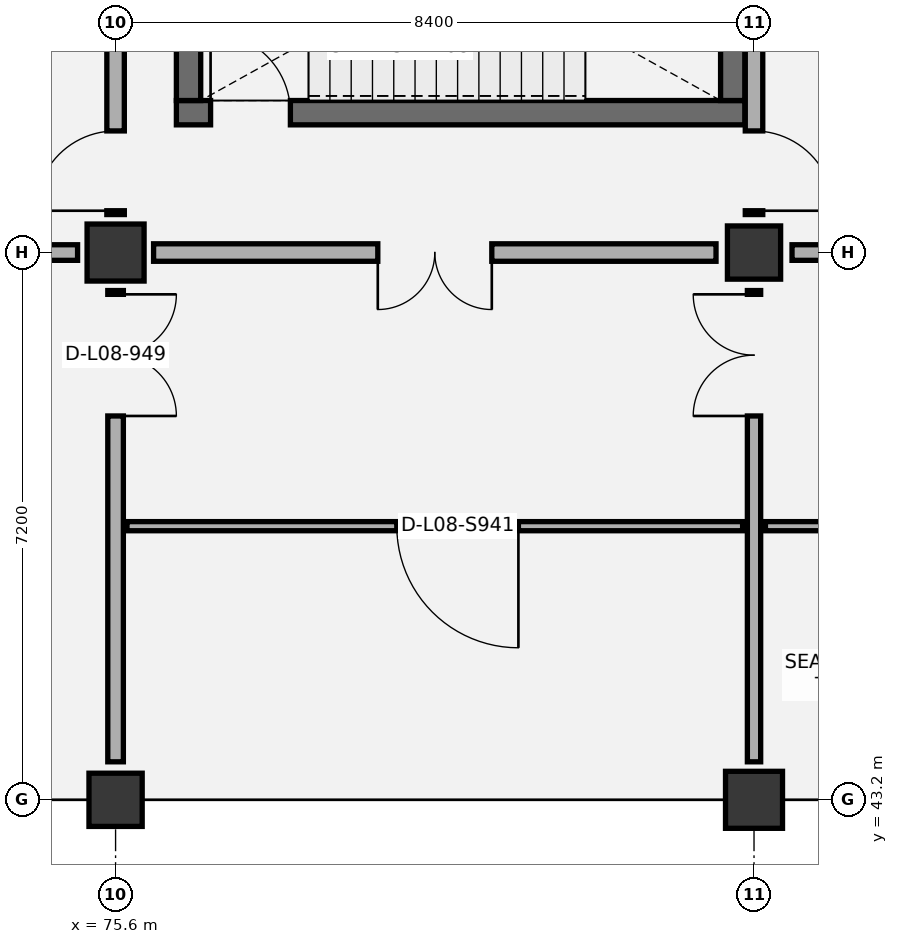
"""IFC4 building model, lengths in metres.
Left out: names, types, materials, properties, quantities, classifications, styles, units other than length and angle.
Written with IfcOpenShell. Run it as: python <this file> out.ifc"""

import sys

from ifc_helpers import new_model, si_unit, direction, frame, frame_2d, origin, origin_2d, place, context, subcontext, project, spatial, rectangle, extrude, element, fill, save


model = new_model("IFC4")
c1 = context("Model", 3, precision=1e-05, world=origin(), true_north=direction((0.0, 1.0)))
c2 = subcontext(c1, "Body", "Model", "MODEL_VIEW")
j1 = project(units=[si_unit("LENGTHUNIT", "METRE"), si_unit("PLANEANGLEUNIT", "RADIAN")], contexts=[c1])
p1 = place(None, origin())
s1 = spatial("IfcSite", under=j1, at=p1, CompositionType="ELEMENT")
p2 = place(p1, origin())
s2 = spatial("IfcBuilding", under=s1, at=p2, CompositionType="ELEMENT")
p3 = place(p2, frame((0.0, 0.0, 39.6)))
s3 = spatial("IfcBuildingStorey", under=s2, at=p3, CompositionType="ELEMENT", Elevation=39.6)
p4 = place(p3, frame((75.6, 43.2, 0.0), z_axis=(0.0, 0.0, 1.0), x_axis=(1.0, 0.0, 0.0)))
e1 = element("IfcColumn", 1, at=p4, inside=s3, PredefinedType="COLUMN", context=c2, shape_type="SweptSolid", body=[
    extrude(rectangle(XDim=0.7, YDim=0.7, at=origin_2d()), origin(), (0.0, 0.0, 1.0), 4.2),
])
for number, where, z_axis, x_axis in (
    (2, (75.6, 50.4, 0.0), (0.0, 0.0, 1.0), (1.0, 0.0, 0.0)),
    (3, (84.0, 43.2, 0.0), (0.0, 0.0, 1.0), (1.0, 0.0, 0.0)),
):
    element("IfcColumn", number, at=place(p3, frame(where, z_axis=z_axis, x_axis=x_axis)), inside=s3, PredefinedType="COLUMN", context=c2, shape_type="SweptSolid", body=[
        extrude(rectangle(XDim=0.75, YDim=0.75, at=origin_2d()), origin(), (0.0, 0.0, 1.0), 4.2),
    ])
p5 = place(p3, frame((84.0, 50.4, 0.0), z_axis=(0.0, 0.0, 1.0), x_axis=(1.0, 0.0, 0.0)))
e4 = element("IfcColumn", 4, at=p5, inside=s3, PredefinedType="COLUMN", context=c2, shape_type="SweptSolid", body=[
    extrude(rectangle(XDim=0.7, YDim=0.7, at=origin_2d()), origin(), (0.0, 0.0, 1.0), 4.2),
])
p6 = place(p3, frame((76.4, 52.24, 0.0), z_axis=(0.0, 0.0, 1.0), x_axis=(1.0, 0.0, 0.0)))
e5 = element("IfcWall", 5, at=p6, inside=s3, PredefinedType="SHEAR", context=c2, shape_type="SweptSolid", body=[
    extrude(rectangle(XDim=7.48, YDim=0.32, at=frame_2d((3.74, 0.0))), origin(), (0.0, 0.0, 1.0), 3.9),
])
p7 = place(p6, frame((0.45, 0.0, 0.0)))
e6 = element("IfcOpeningElement", 6, at=p7, cuts=e5, PredefinedType="OPENING", context=c2, shape_type="SweptSolid", body=[
    extrude(rectangle(XDim=1.05, YDim=2.15, at=frame_2d((0.525, 1.075))), frame((0.0, 0.17, 0.0), z_axis=(0.0, -1.0, 0.0), x_axis=(1.0, 0.0, 0.0)), (0.0, 0.0, 1.0), 0.34),
])
for number, where, z_axis, x_axis in (
    (7, (76.56, 52.4, 0.0), (0.0, 0.0, 1.0), (0.0, 1.0, 0.0)),
    (8, (83.72, 52.4, 0.0), (0.0, 0.0, 1.0), (0.0, 1.0, 0.0)),
):
    element("IfcWall", number, at=place(p3, frame(where, z_axis=z_axis, x_axis=x_axis)), inside=s3, PredefinedType="SHEAR", context=c2, shape_type="SweptSolid", body=[
        extrude(rectangle(XDim=3.8, YDim=0.32, at=frame_2d((1.9, 0.0))), origin(), (0.0, 0.0, 1.0), 3.9),
    ])
p8 = place(p3, frame((75.75, 46.8, 0.0), z_axis=(0.0, 0.0, 1.0), x_axis=(1.0, 0.0, 0.0)))
e9 = element("IfcWall", 9, at=p8, inside=s3, PredefinedType="PARTITIONING", context=c2, shape_type="SweptSolid", body=[
    extrude(rectangle(XDim=8.1, YDim=0.12, at=frame_2d((4.05, 0.0))), origin(), (0.0, 0.0, 1.0), 3.9),
])
p9 = place(p8, frame((3.55, 0.0, 0.0)))
e10 = element("IfcOpeningElement", 10, at=p9, cuts=e9, PredefinedType="OPENING", context=c2, shape_type="SweptSolid", body=[
    extrude(rectangle(XDim=1.6, YDim=2.2, at=frame_2d((0.8, 1.1))), frame((0.0, 0.07, 0.0), z_axis=(0.0, -1.0, 0.0), x_axis=(1.0, 0.0, 0.0)), (0.0, 0.0, 1.0), 0.14),
])
p10 = place(p3, frame((84.15, 46.8, 0.0), z_axis=(0.0, 0.0, 1.0), x_axis=(1.0, 0.0, 0.0)))
e11 = element("IfcWall", 11, at=p10, inside=s3, PredefinedType="PARTITIONING", context=c2, shape_type="SweptSolid", body=[
    extrude(rectangle(XDim=8.1, YDim=0.12, at=frame_2d((4.05, 0.0))), origin(), (0.0, 0.0, 1.0), 3.9),
])
p11 = place(p10, frame((3.55, 0.0, 0.0)))
e12 = element("IfcOpeningElement", 12, at=p11, cuts=e11, PredefinedType="OPENING", context=c2, shape_type="SweptSolid", body=[
    extrude(rectangle(XDim=1.6, YDim=2.2, at=frame_2d((0.8, 1.1))), frame((0.0, 0.07, 0.0), z_axis=(0.0, -1.0, 0.0), x_axis=(1.0, 0.0, 0.0)), (0.0, 0.0, 1.0), 0.14),
])
p12 = place(p3, frame((75.6, 43.7, 0.0), z_axis=(0.0, 0.0, 1.0), x_axis=(0.0, 1.0, 0.0)))
e13 = element("IfcWall", 13, at=p12, inside=s3, PredefinedType="PARTITIONING", context=c2, shape_type="SweptSolid", body=[
    extrude(rectangle(XDim=6.2, YDim=0.205, at=frame_2d((3.1, 0.0))), origin(), (0.0, 0.0, 1.0), 3.295),
])
p13 = place(p12, frame((4.55, 0.0, 0.0)))
e14 = element("IfcOpeningElement", 14, at=p13, cuts=e13, PredefinedType="OPENING", context=c2, shape_type="SweptSolid", body=[
    extrude(rectangle(XDim=1.6, YDim=2.2, at=frame_2d((0.8, 1.1))), frame((0.0, 0.113, 0.0), z_axis=(0.0, -1.0, 0.0), x_axis=(1.0, 0.0, 0.0)), (0.0, 0.0, 1.0), 0.225),
])
p14 = place(p3, frame((67.7, 50.4, 0.0), z_axis=(0.0, 0.0, 1.0), x_axis=(1.0, 0.0, 0.0)))
e15 = element("IfcWall", 15, at=p14, inside=s3, PredefinedType="PARTITIONING", context=c2, shape_type="SweptSolid", body=[
    extrude(rectangle(XDim=7.4, YDim=0.205, at=frame_2d((3.7, 0.0))), origin(), (0.0, 0.0, 1.0), 3.245),
])
p15 = place(p14, frame((2.95, 0.0, 0.0)))
e16 = element("IfcOpeningElement", 16, at=p15, cuts=e15, PredefinedType="OPENING", context=c2, shape_type="SweptSolid", body=[
    extrude(rectangle(XDim=1.5, YDim=2.2, at=frame_2d((0.75, 1.1))), frame((0.0, 0.113, 0.0), z_axis=(0.0, -1.0, 0.0), x_axis=(1.0, 0.0, 0.0)), (0.0, 0.0, 1.0), 0.225),
])
p16 = place(p3, frame((75.6, 50.9, 0.0), z_axis=(0.0, 0.0, 1.0), x_axis=(0.0, 1.0, 0.0)))
e17 = element("IfcWall", 17, at=p16, inside=s3, PredefinedType="PARTITIONING", context=c2, shape_type="SweptSolid", body=[
    extrude(rectangle(XDim=6.2, YDim=0.23, at=frame_2d((3.1, 0.0))), origin(), (0.0, 0.0, 1.0), 3.445),
])
p17 = place(p16, frame((0.05, 0.0, 0.0)))
e18 = element("IfcOpeningElement", 18, at=p17, cuts=e17, PredefinedType="OPENING", context=c2, shape_type="SweptSolid", body=[
    extrude(rectangle(XDim=1.05, YDim=2.15, at=frame_2d((0.525, 1.075))), frame((0.0, 0.125, 0.0), z_axis=(0.0, -1.0, 0.0), x_axis=(1.0, 0.0, 0.0)), (0.0, 0.0, 1.0), 0.25),
])
p18 = place(p3, frame((84.0, 43.7, 0.0), z_axis=(0.0, 0.0, 1.0), x_axis=(0.0, 1.0, 0.0)))
e19 = element("IfcWall", 19, at=p18, inside=s3, PredefinedType="PARTITIONING", context=c2, shape_type="SweptSolid", body=[
    extrude(rectangle(XDim=6.2, YDim=0.175, at=frame_2d((3.1, 0.0))), origin(), (0.0, 0.0, 1.0), 3.495),
])
p19 = place(p18, frame((4.55, 0.0, 0.0)))
e20 = element("IfcOpeningElement", 20, at=p19, cuts=e19, PredefinedType="OPENING", context=c2, shape_type="SweptSolid", body=[
    extrude(rectangle(XDim=1.6, YDim=2.2, at=frame_2d((0.8, 1.1))), frame((0.0, 0.097, 0.0), z_axis=(0.0, -1.0, 0.0), x_axis=(1.0, 0.0, 0.0)), (0.0, 0.0, 1.0), 0.195),
])
p20 = place(p3, frame((76.1, 50.4, 0.0), z_axis=(0.0, 0.0, 1.0), x_axis=(1.0, 0.0, 0.0)))
e21 = element("IfcWall", 21, at=p20, inside=s3, PredefinedType="PARTITIONING", context=c2, shape_type="SweptSolid", body=[
    extrude(rectangle(XDim=7.4, YDim=0.23, at=frame_2d((3.7, 0.0))), origin(), (0.0, 0.0, 1.0), 3.295),
])
p21 = place(p20, frame((2.95, 0.0, 0.0)))
e22 = element("IfcOpeningElement", 22, at=p21, cuts=e21, PredefinedType="OPENING", context=c2, shape_type="SweptSolid", body=[
    extrude(rectangle(XDim=1.5, YDim=2.15, at=frame_2d((0.75, 1.075))), frame((0.0, 0.125, 0.0), z_axis=(0.0, -1.0, 0.0), x_axis=(1.0, 0.0, 0.0)), (0.0, 0.0, 1.0), 0.25),
])
p22 = place(p3, frame((84.0, 50.9, 0.0), z_axis=(0.0, 0.0, 1.0), x_axis=(0.0, 1.0, 0.0)))
e23 = element("IfcWall", 23, at=p22, inside=s3, PredefinedType="PARTITIONING", context=c2, shape_type="SweptSolid", body=[
    extrude(rectangle(XDim=6.2, YDim=0.23, at=frame_2d((3.1, 0.0))), origin(), (0.0, 0.0, 1.0), 3.345),
])
p23 = place(p22, frame((0.05, 0.0, 0.0)))
e24 = element("IfcOpeningElement", 24, at=p23, cuts=e23, PredefinedType="OPENING", context=c2, shape_type="SweptSolid", body=[
    extrude(rectangle(XDim=1.05, YDim=2.15, at=frame_2d((0.525, 1.075))), frame((0.0, 0.125, 0.0), z_axis=(0.0, -1.0, 0.0), x_axis=(1.0, 0.0, 0.0)), (0.0, 0.0, 1.0), 0.25),
])
p24 = place(p3, frame((84.5, 50.4, 0.0), z_axis=(0.0, 0.0, 1.0), x_axis=(1.0, 0.0, 0.0)))
e25 = element("IfcWall", 25, at=p24, inside=s3, PredefinedType="PARTITIONING", context=c2, shape_type="SweptSolid", body=[
    extrude(rectangle(XDim=7.4, YDim=0.205, at=frame_2d((3.7, 0.0))), origin(), (0.0, 0.0, 1.0), 3.295),
])
p25 = place(p24, frame((3.05, 0.0, 0.0)))
e26 = element("IfcOpeningElement", 26, at=p25, cuts=e25, PredefinedType="OPENING", context=c2, shape_type="SweptSolid", body=[
    extrude(rectangle(XDim=1.3, YDim=2.15, at=frame_2d((0.65, 1.075))), frame((0.0, 0.113, 0.0), z_axis=(0.0, -1.0, 0.0), x_axis=(1.0, 0.0, 0.0)), (0.0, 0.0, 1.0), 0.225),
])
p26 = place(p7, origin())
e27 = element("IfcDoor", 27, at=p26, inside=s3, OperationType="SINGLE_SWING_LEFT", PredefinedType="DOOR", context=c2, shape_type="SweptSolid", body=[
    extrude(rectangle(XDim=1.05, YDim=2.15, at=frame_2d((0.525, 1.075))), frame((0.0, 0.025, 0.0), z_axis=(0.0, -1.0, 0.0), x_axis=(1.0, 0.0, 0.0)), (0.0, 0.0, 1.0), 0.05),
])
fill(e6, e27)
p27 = place(p9, frame((1.6, 0.0, 0.0), z_axis=(0.0, 0.0, 1.0), x_axis=(-1.0, 0.0, 0.0)))
e28 = element("IfcDoor", 28, at=p27, inside=s3, OperationType="SINGLE_SWING_LEFT", PredefinedType="DOOR", context=c2, shape_type="SweptSolid", body=[
    extrude(rectangle(XDim=1.6, YDim=2.2, at=frame_2d((0.8, 1.1))), frame((0.0, 0.025, 0.0), z_axis=(0.0, -1.0, 0.0), x_axis=(1.0, 0.0, 0.0)), (0.0, 0.0, 1.0), 0.05),
])
fill(e10, e28)
p28 = place(p13, frame((1.6, 0.0, 0.0), z_axis=(0.0, 0.0, 1.0), x_axis=(-1.0, 0.0, 0.0)))
e29 = element("IfcDoor", 29, at=p28, inside=s3, OperationType="DOUBLE_DOOR_SINGLE_SWING", PredefinedType="DOOR", context=c2, shape_type="SweptSolid", body=[
    extrude(rectangle(XDim=1.6, YDim=2.2, at=frame_2d((0.8, 1.1))), frame((0.0, 0.025, 0.0), z_axis=(0.0, -1.0, 0.0), x_axis=(1.0, 0.0, 0.0)), (0.0, 0.0, 1.0), 0.05),
])
fill(e14, e29)
p29 = place(p17, origin())
e30 = element("IfcDoor", 30, at=p29, inside=s3, OperationType="SINGLE_SWING_LEFT", PredefinedType="DOOR", context=c2, shape_type="SweptSolid", body=[
    extrude(rectangle(XDim=1.05, YDim=2.15, at=frame_2d((0.525, 1.075))), frame((0.0, 0.025, 0.0), z_axis=(0.0, -1.0, 0.0), x_axis=(1.0, 0.0, 0.0)), (0.0, 0.0, 1.0), 0.05),
])
fill(e18, e30)
p30 = place(p19, origin())
e31 = element("IfcDoor", 31, at=p30, inside=s3, OperationType="DOUBLE_DOOR_SINGLE_SWING", PredefinedType="DOOR", context=c2, shape_type="SweptSolid", body=[
    extrude(rectangle(XDim=1.6, YDim=2.2, at=frame_2d((0.8, 1.1))), frame((0.0, 0.025, 0.0), z_axis=(0.0, -1.0, 0.0), x_axis=(1.0, 0.0, 0.0)), (0.0, 0.0, 1.0), 0.05),
])
fill(e20, e31)
p31 = place(p21, frame((1.5, 0.0, 0.0), z_axis=(0.0, 0.0, 1.0), x_axis=(-1.0, 0.0, 0.0)))
e32 = element("IfcDoor", 32, at=p31, inside=s3, OperationType="DOUBLE_DOOR_SINGLE_SWING", PredefinedType="DOOR", context=c2, shape_type="SweptSolid", body=[
    extrude(rectangle(XDim=1.5, YDim=2.15, at=frame_2d((0.75, 1.075))), frame((0.0, 0.025, 0.0), z_axis=(0.0, -1.0, 0.0), x_axis=(1.0, 0.0, 0.0)), (0.0, 0.0, 1.0), 0.05),
])
fill(e22, e32)
p32 = place(p23, frame((1.05, 0.0, 0.0), z_axis=(0.0, 0.0, 1.0), x_axis=(-1.0, 0.0, 0.0)))
e33 = element("IfcDoor", 33, at=p32, inside=s3, OperationType="SINGLE_SWING_RIGHT", PredefinedType="DOOR", context=c2, shape_type="SweptSolid", body=[
    extrude(rectangle(XDim=1.05, YDim=2.15, at=frame_2d((0.525, 1.075))), frame((0.0, 0.025, 0.0), z_axis=(0.0, -1.0, 0.0), x_axis=(1.0, 0.0, 0.0)), (0.0, 0.0, 1.0), 0.05),
])
fill(e24, e33)
save(model, sys.argv[1])
